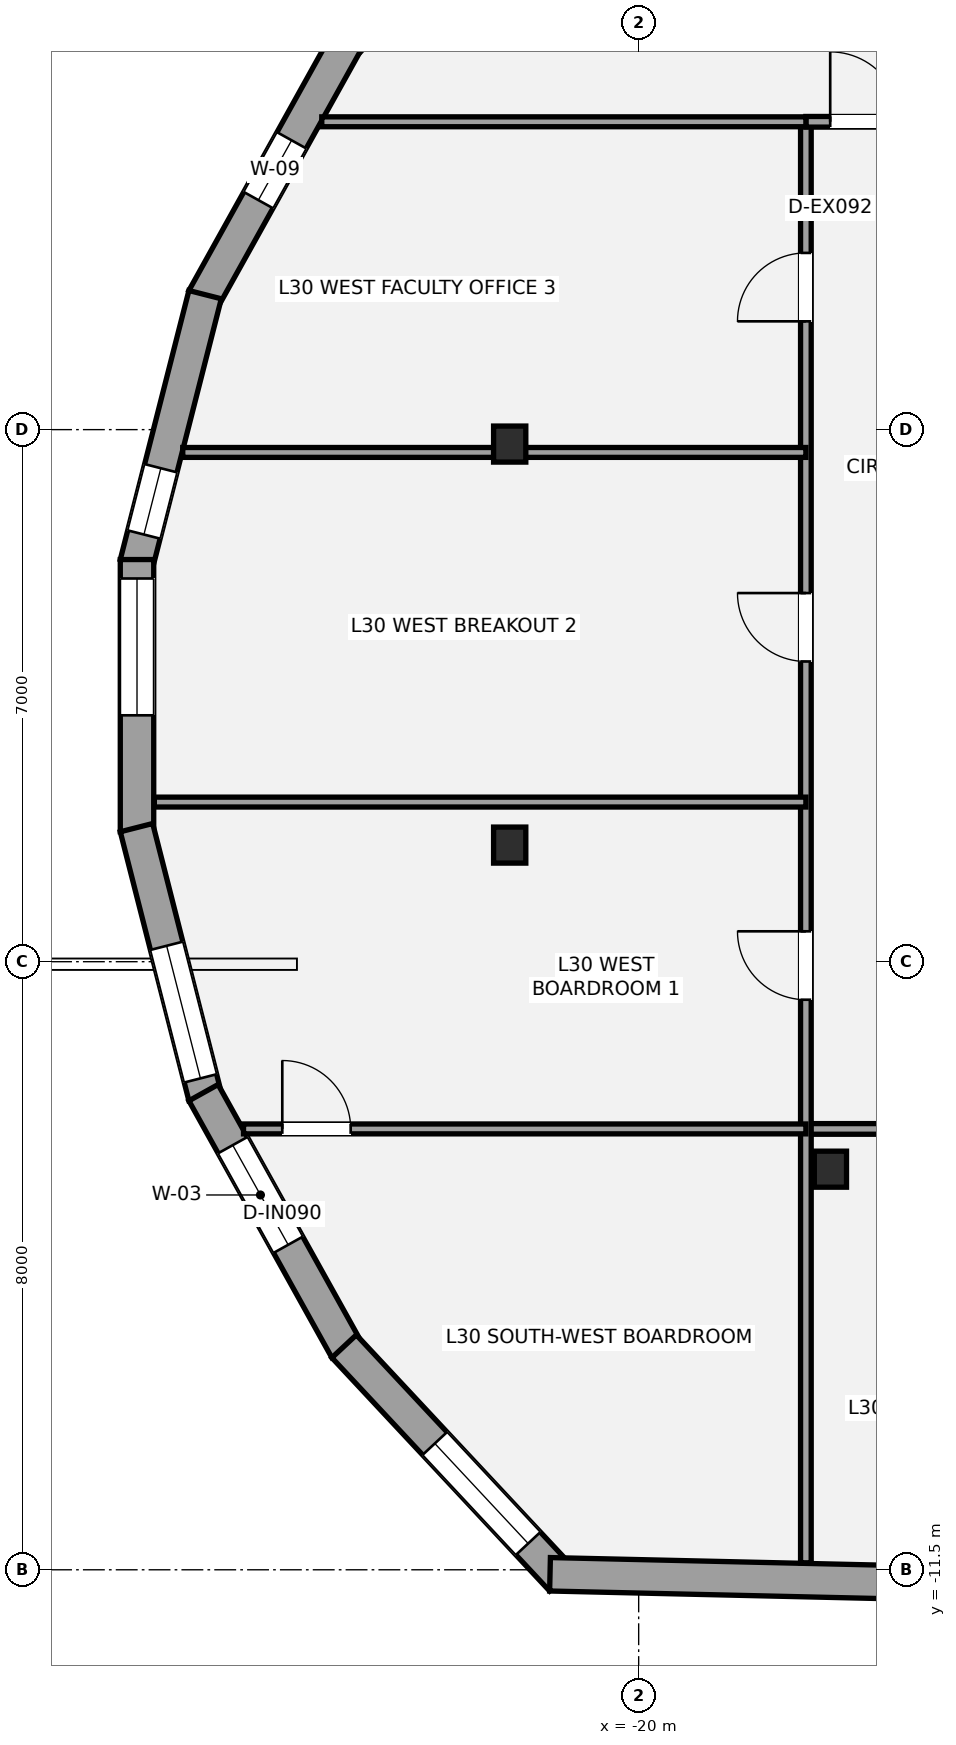
"""IFC4 building model, lengths in metres.
Left out: names, types, materials, properties, quantities, classifications, styles, units other than length and angle.
Written with IfcOpenShell. Run it as: python <this file> out.ifc"""

import sys

from ifc_helpers import new_model, si_unit, direction, frame, frame_2d, origin, origin_2d, place, context, subcontext, project, spatial, rectangle, i_section, extrude, element, fill, save


model = new_model("IFC4")
c1 = context("Model", 3, precision=1e-05, world=origin(), true_north=direction((0.0, 1.0)))
c2 = subcontext(c1, "Body", "Model", "MODEL_VIEW")
j1 = project(units=[si_unit("LENGTHUNIT", "METRE"), si_unit("PLANEANGLEUNIT", "RADIAN")], contexts=[c1])
p1 = place(None, origin())
s1 = spatial("IfcSite", under=j1, at=p1, CompositionType="ELEMENT")
p2 = place(p1, origin())
s2 = spatial("IfcBuilding", under=s1, at=p2, CompositionType="ELEMENT")
p3 = place(p2, frame((0.0, 0.0, 114.1)))
s3 = spatial("IfcBuildingStorey", under=s2, at=p3, CompositionType="ELEMENT", Elevation=114.1)
for number, where, z_axis, x_axis in (
    (1, (-21.697, 3.31, 0.0), (0.0, 0.0, 1.0), (1.0, 0.0, 0.0)),
    (2, (-21.697, -1.966, 0.0), (0.0, 0.0, 1.0), (1.0, 0.0, 0.0)),
    (3, (-17.477, -6.229, 0.0), (0.0, 0.0, 1.0), (1.0, 0.0, 0.0)),
):
    element("IfcColumn", number, at=place(p3, frame(where, z_axis=z_axis, x_axis=x_axis)), inside=s3, PredefinedType="COLUMN", context=c2, shape_type="SweptSolid", body=[
        extrude(i_section(OverallWidth=0.424, OverallDepth=0.474, WebThickness=0.048, FlangeThickness=0.077, at=origin_2d()), origin(), (0.0, 0.0, 1.0), 3.5),
    ])
p4 = place(p3, frame((-23.875, 8.56, 0.0), z_axis=(0.0, 0.0, 1.0), x_axis=(0.682353469166, 0.73102239577, 0.0)))
e4 = element("IfcWall", 4, at=p4, inside=s3, PredefinedType="STANDARD", context=c2, shape_type="SweptSolid", body=[
    extrude(rectangle(XDim=4.199, YDim=0.44, at=frame_2d((2.099, 0.0))), origin(), (0.0, 0.0, 1.0), 2.528),
])
p5 = place(p4, frame((0.7, 0.0, 0.65)))
e5 = element("IfcOpeningElement", 5, at=p5, cuts=e4, PredefinedType="OPENING", context=c2, shape_type="SweptSolid", body=[
    extrude(rectangle(XDim=1.8, YDim=1.7, at=frame_2d((0.9, 0.85))), frame((0.0, 0.23, 0.0), z_axis=(0.0, -1.0, 0.0), x_axis=(1.0, 0.0, 0.0)), (0.0, 0.0, 1.0), 0.46),
])
p6 = place(p3, frame((-25.725, 5.223, 0.0), z_axis=(0.0, 0.0, 1.0), x_axis=(0.486285838125, 0.873799796086, 0.0)))
e6 = element("IfcWall", 6, at=p6, inside=s3, PredefinedType="STANDARD", context=c2, shape_type="SweptSolid", body=[
    extrude(rectangle(XDim=3.868, YDim=0.44, at=frame_2d((1.934, 0.0))), origin(), (0.0, 0.0, 1.0), 2.528),
])
p7 = place(p6, frame((1.484, 0.0, 0.58)))
e7 = element("IfcOpeningElement", 7, at=p7, cuts=e6, PredefinedType="OPENING", context=c2, shape_type="SweptSolid", body=[
    extrude(rectangle(XDim=0.9, YDim=1.35, at=frame_2d((0.45, 0.675))), frame((0.0, 0.23, 0.0), z_axis=(0.0, -1.0, 0.0), x_axis=(1.0, 0.0, 0.0)), (0.0, 0.0, 1.0), 0.46),
])
p8 = place(p3, frame((-26.607, 1.736, 0.0), z_axis=(0.0, 0.0, 1.0), x_axis=(0.247172296022, 0.968971545547, 0.0)))
e8 = element("IfcWall", 8, at=p8, inside=s3, PredefinedType="STANDARD", context=c2, shape_type="SweptSolid", body=[
    extrude(rectangle(XDim=3.653, YDim=0.44, at=frame_2d((1.826, 0.0))), origin(), (0.0, 0.0, 1.0), 2.528),
])
p9 = place(p8, frame((0.396, 0.0, 0.58)))
e9 = element("IfcOpeningElement", 9, at=p9, cuts=e8, PredefinedType="OPENING", context=c2, shape_type="SweptSolid", body=[
    extrude(rectangle(XDim=0.9, YDim=1.35, at=frame_2d((0.45, 0.675))), frame((0.0, 0.23, 0.0), z_axis=(0.0, -1.0, 0.0), x_axis=(1.0, 0.0, 0.0)), (0.0, 0.0, 1.0), 0.46),
])
p10 = place(p3, frame((-26.6, -1.791, 0.0), z_axis=(0.0, 0.0, 1.0), x_axis=(0.0, 1.0, 0.0)))
e10 = element("IfcWall", 10, at=p10, inside=s3, PredefinedType="STANDARD", context=c2, shape_type="SweptSolid", body=[
    extrude(rectangle(XDim=3.582, YDim=0.44, at=frame_2d((1.791, 0.0))), origin(), (0.0, 0.0, 1.0), 2.528),
])
p11 = place(p10, frame((1.532, 0.0, 0.65)))
e11 = element("IfcOpeningElement", 11, at=p11, cuts=e10, PredefinedType="OPENING", context=c2, shape_type="SweptSolid", body=[
    extrude(rectangle(XDim=1.8, YDim=1.7, at=frame_2d((0.9, 0.85))), frame((0.0, 0.23, 0.0), z_axis=(0.0, -1.0, 0.0), x_axis=(1.0, 0.0, 0.0)), (0.0, 0.0, 1.0), 0.46),
])
p12 = place(p3, frame((-25.704, -5.276, 0.0), z_axis=(0.0, 0.0, 1.0), x_axis=(-0.247172296022, 0.968971545547, 0.0)))
e12 = element("IfcWall", 12, at=p12, inside=s3, PredefinedType="STANDARD", context=c2, shape_type="SweptSolid", body=[
    extrude(rectangle(XDim=3.653, YDim=0.44, at=frame_2d((1.826, 0.0))), origin(), (0.0, 0.0, 1.0), 2.528),
])
p13 = place(p12, frame((0.248, 0.0, 0.65)))
e13 = element("IfcOpeningElement", 13, at=p13, cuts=e12, PredefinedType="OPENING", context=c2, shape_type="SweptSolid", body=[
    extrude(rectangle(XDim=1.8, YDim=1.7, at=frame_2d((0.9, 0.85))), frame((0.0, 0.23, 0.0), z_axis=(0.0, -1.0, 0.0), x_axis=(1.0, 0.0, 0.0)), (0.0, 0.0, 1.0), 0.46),
])
p14 = place(p3, frame((-23.844, -8.603, 0.0), z_axis=(0.0, 0.0, 1.0), x_axis=(-0.486285838125, 0.873799796086, 0.0)))
e14 = element("IfcWall", 14, at=p14, inside=s3, PredefinedType="STANDARD", context=c2, shape_type="SweptSolid", body=[
    extrude(rectangle(XDim=3.868, YDim=0.44, at=frame_2d((1.934, 0.0))), origin(), (0.0, 0.0, 1.0), 2.528),
])
p15 = place(p14, frame((1.578, 0.0, 0.65)))
e15 = element("IfcOpeningElement", 15, at=p15, cuts=e14, PredefinedType="OPENING", context=c2, shape_type="SweptSolid", body=[
    extrude(rectangle(XDim=1.5, YDim=1.7, at=frame_2d((0.75, 0.85))), frame((0.0, 0.23, 0.0), z_axis=(0.0, -1.0, 0.0), x_axis=(1.0, 0.0, 0.0)), (0.0, 0.0, 1.0), 0.46),
])
p16 = place(p3, frame((-21.01, -11.629, 0.0), z_axis=(0.0, 0.0, 1.0), x_axis=(-0.682353469166, 0.73102239577, 0.0)))
e16 = element("IfcWall", 16, at=p16, inside=s3, PredefinedType="STANDARD", context=c2, shape_type="SweptSolid", body=[
    extrude(rectangle(XDim=4.199, YDim=0.44, at=frame_2d((2.099, 0.0))), origin(), (0.0, 0.0, 1.0), 2.528),
])
p17 = place(p16, frame((0.65, 0.0, 0.65)))
e17 = element("IfcOpeningElement", 17, at=p17, cuts=e16, PredefinedType="OPENING", context=c2, shape_type="SweptSolid", body=[
    extrude(rectangle(XDim=1.8, YDim=1.7, at=frame_2d((0.9, 0.85))), frame((0.0, 0.23, 0.0), z_axis=(0.0, -1.0, 0.0), x_axis=(1.0, 0.0, 0.0)), (0.0, 0.0, 1.0), 0.46),
])
p18 = place(p3, frame((-14.44, -11.713, 0.0), z_axis=(0.0, 0.0, 1.0), x_axis=(-0.999739488543, 0.022824439704, 0.0)))
e18 = element("IfcWall", 18, at=p18, inside=s3, PredefinedType="STANDARD", context=c2, shape_type="SweptSolid", body=[
    extrude(rectangle(XDim=6.728, YDim=0.44, at=frame_2d((3.364, 0.0))), origin(), (0.0, 0.0, 1.0), 2.532),
])
p19 = place(p3, frame((-17.8, -5.7, 0.0), z_axis=(0.0, 0.0, 1.0), x_axis=(1.0, 0.0, 0.0)))
e19 = element("IfcWall", 19, at=p19, inside=s3, PredefinedType="PARTITIONING", context=c2, shape_type="SweptSolid", body=[
    extrude(rectangle(XDim=34.2, YDim=0.14, at=frame_2d((17.1, 0.0))), origin(), (0.0, 0.0, 1.0), 2.688),
])
p20 = place(p19, frame((3.4, 0.0, 0.0)))
e20 = element("IfcOpeningElement", 20, at=p20, cuts=e19, PredefinedType="OPENING", context=c2, shape_type="SweptSolid", body=[
    extrude(rectangle(XDim=1.5, YDim=2.15, at=frame_2d((0.75, 1.075))), frame((0.0, 0.08, 0.0), z_axis=(0.0, -1.0, 0.0), x_axis=(1.0, 0.0, 0.0)), (0.0, 0.0, 1.0), 0.16),
])
p21 = place(p19, frame((9.874, 0.0, 0.0)))
e21 = element("IfcOpeningElement", 21, at=p21, cuts=e19, PredefinedType="OPENING", context=c2, shape_type="SweptSolid", body=[
    extrude(rectangle(XDim=0.9, YDim=2.1, at=frame_2d((0.45, 1.05))), frame((0.0, 0.08, 0.0), z_axis=(0.0, -1.0, 0.0), x_axis=(1.0, 0.0, 0.0)), (0.0, 0.0, 1.0), 0.16),
])
p22 = place(p19, frame((13.147, 0.0, 0.0)))
e22 = element("IfcOpeningElement", 22, at=p22, cuts=e19, PredefinedType="OPENING", context=c2, shape_type="SweptSolid", body=[
    extrude(rectangle(XDim=0.9, YDim=2.1, at=frame_2d((0.45, 1.05))), frame((0.0, 0.08, 0.0), z_axis=(0.0, -1.0, 0.0), x_axis=(1.0, 0.0, 0.0)), (0.0, 0.0, 1.0), 0.16),
])
p23 = place(p19, frame((18.823, 0.0, 0.0)))
e23 = element("IfcOpeningElement", 23, at=p23, cuts=e19, PredefinedType="OPENING", context=c2, shape_type="SweptSolid", body=[
    extrude(rectangle(XDim=1.5, YDim=2.15, at=frame_2d((0.75, 1.075))), frame((0.0, 0.08, 0.0), z_axis=(0.0, -1.0, 0.0), x_axis=(1.0, 0.0, 0.0)), (0.0, 0.0, 1.0), 0.16),
])
p24 = place(p19, frame((28.5, 0.0, 0.0)))
e24 = element("IfcOpeningElement", 24, at=p24, cuts=e19, PredefinedType="OPENING", context=c2, shape_type="SweptSolid", body=[
    extrude(rectangle(XDim=1.5, YDim=2.15, at=frame_2d((0.75, 1.075))), frame((0.0, 0.08, 0.0), z_axis=(0.0, -1.0, 0.0), x_axis=(1.0, 0.0, 0.0)), (0.0, 0.0, 1.0), 0.16),
])
p25 = place(p3, frame((-17.8, -11.408, 0.0), z_axis=(0.0, 0.0, 1.0), x_axis=(0.0, 1.0, 0.0)))
e25 = element("IfcWall", 25, at=p25, inside=s3, PredefinedType="PARTITIONING", context=c2, shape_type="SweptSolid", body=[
    extrude(rectangle(XDim=18.958, YDim=0.14, at=frame_2d((9.479, 0.0))), origin(), (0.0, 0.0, 1.0), 2.688),
])
p26 = place(p25, frame((7.408, 0.0, 0.0)))
e26 = element("IfcOpeningElement", 26, at=p26, cuts=e25, PredefinedType="OPENING", context=c2, shape_type="SweptSolid", body=[
    extrude(rectangle(XDim=0.9, YDim=2.1, at=frame_2d((0.45, 1.05))), frame((0.0, 0.08, 0.0), z_axis=(0.0, -1.0, 0.0), x_axis=(1.0, 0.0, 0.0)), (0.0, 0.0, 1.0), 0.16),
])
p27 = place(p25, frame((11.858, 0.0, 0.0)))
e27 = element("IfcOpeningElement", 27, at=p27, cuts=e25, PredefinedType="OPENING", context=c2, shape_type="SweptSolid", body=[
    extrude(rectangle(XDim=0.9, YDim=2.1, at=frame_2d((0.45, 1.05))), frame((0.0, 0.08, 0.0), z_axis=(0.0, -1.0, 0.0), x_axis=(1.0, 0.0, 0.0)), (0.0, 0.0, 1.0), 0.16),
])
p28 = place(p25, frame((16.333, 0.0, 0.0)))
e28 = element("IfcOpeningElement", 28, at=p28, cuts=e25, PredefinedType="OPENING", context=c2, shape_type="SweptSolid", body=[
    extrude(rectangle(XDim=0.9, YDim=2.1, at=frame_2d((0.45, 1.05))), frame((0.0, 0.08, 0.0), z_axis=(0.0, -1.0, 0.0), x_axis=(1.0, 0.0, 0.0)), (0.0, 0.0, 1.0), 0.16),
])
p29 = place(p3, frame((-17.8, 7.55, 0.0), z_axis=(0.0, 0.0, 1.0), x_axis=(1.0, 0.0, 0.0)))
e29 = element("IfcWall", 29, at=p29, inside=s3, PredefinedType="PARTITIONING", context=c2, shape_type="SweptSolid", body=[
    extrude(rectangle(XDim=3.9, YDim=0.14, at=frame_2d((1.95, 0.0))), origin(), (0.0, 0.0, 1.0), 2.763),
])
p30 = place(p29, frame((0.32, 0.0, 0.0)))
e30 = element("IfcOpeningElement", 30, at=p30, cuts=e29, PredefinedType="OPENING", context=c2, shape_type="SweptSolid", body=[
    extrude(rectangle(XDim=0.92, YDim=2.15, at=frame_2d((0.46, 1.075))), frame((0.0, 0.08, 0.0), z_axis=(0.0, -1.0, 0.0), x_axis=(1.0, 0.0, 0.0)), (0.0, 0.0, 1.0), 0.16),
])
p31 = place(p3, frame((-24.169, 7.55, 0.0), z_axis=(0.0, 0.0, 1.0), x_axis=(1.0, 0.0, 0.0)))
e31 = element("IfcWall", 31, at=p31, inside=s3, PredefinedType="PARTITIONING", context=c2, shape_type="SweptSolid", body=[
    extrude(rectangle(XDim=6.369, YDim=0.13, at=frame_2d((3.185, 0.0))), origin(), (0.0, 0.0, 1.0), 3.31),
])
p32 = place(p3, frame((-25.199, -5.7, 0.0), z_axis=(0.0, 0.0, 1.0), x_axis=(1.0, 0.0, 0.0)))
e32 = element("IfcWall", 32, at=p32, inside=s3, PredefinedType="PARTITIONING", context=c2, shape_type="SweptSolid", body=[
    extrude(rectangle(XDim=7.399, YDim=0.13, at=frame_2d((3.699, 0.0))), origin(), (0.0, 0.0, 1.0), 2.688),
])
p33 = place(p32, frame((0.51, 0.0, 0.0)))
e33 = element("IfcOpeningElement", 33, at=p33, cuts=e32, PredefinedType="OPENING", context=c2, shape_type="SweptSolid", body=[
    extrude(rectangle(XDim=0.9, YDim=2.1, at=frame_2d((0.45, 1.05))), frame((0.0, 0.075, 0.0), z_axis=(0.0, -1.0, 0.0), x_axis=(1.0, 0.0, 0.0)), (0.0, 0.0, 1.0), 0.15),
])
p34 = place(p3, frame((-26.372, -1.4, 0.0), z_axis=(0.0, 0.0, 1.0), x_axis=(1.0, 0.0, 0.0)))
e34 = element("IfcWall", 34, at=p34, inside=s3, PredefinedType="PARTITIONING", context=c2, shape_type="SweptSolid", body=[
    extrude(rectangle(XDim=8.572, YDim=0.13, at=frame_2d((4.286, 0.0))), origin(), (0.0, 0.0, 1.0), 2.763),
])
p35 = place(p3, frame((-25.999, 3.2, 0.0), z_axis=(0.0, 0.0, 1.0), x_axis=(1.0, 0.0, 0.0)))
e35 = element("IfcWall", 35, at=p35, inside=s3, PredefinedType="PARTITIONING", context=c2, shape_type="SweptSolid", body=[
    extrude(rectangle(XDim=8.198, YDim=0.13, at=frame_2d((4.099, 0.0))), origin(), (0.0, 0.0, 1.0), 2.763),
])
p36 = place(p7, origin())
e36 = element("IfcWindow", 36, at=p36, inside=s3, PartitioningType="SINGLE_PANEL", PredefinedType="WINDOW", context=c2, shape_type="SweptSolid", body=[
    extrude(rectangle(XDim=0.9, YDim=1.35, at=frame_2d((0.45, 0.675))), frame((0.0, -0.01, 0.0), z_axis=(0.0, -1.0, 0.0), x_axis=(1.0, 0.0, 0.0)), (0.0, 0.0, 1.0), 0.06),
])
fill(e7, e36)
p37 = place(p9, origin())
e37 = element("IfcWindow", 37, at=p37, inside=s3, PartitioningType="SINGLE_PANEL", PredefinedType="WINDOW", context=c2, shape_type="SweptSolid", body=[
    extrude(rectangle(XDim=0.9, YDim=1.35, at=frame_2d((0.45, 0.675))), frame((0.0, -0.01, 0.0), z_axis=(0.0, -1.0, 0.0), x_axis=(1.0, 0.0, 0.0)), (0.0, 0.0, 1.0), 0.06),
])
fill(e9, e37)
p38 = place(p11, origin())
e38 = element("IfcWindow", 38, at=p38, inside=s3, PartitioningType="SINGLE_PANEL", PredefinedType="WINDOW", context=c2, shape_type="SweptSolid", body=[
    extrude(rectangle(XDim=1.8, YDim=1.7, at=frame_2d((0.9, 0.85))), frame((0.0, -0.01, 0.0), z_axis=(0.0, -1.0, 0.0), x_axis=(1.0, 0.0, 0.0)), (0.0, 0.0, 1.0), 0.06),
])
fill(e11, e38)
p39 = place(p13, origin())
e39 = element("IfcWindow", 39, at=p39, inside=s3, PartitioningType="SINGLE_PANEL", PredefinedType="WINDOW", context=c2, shape_type="SweptSolid", body=[
    extrude(rectangle(XDim=1.8, YDim=1.7, at=frame_2d((0.9, 0.85))), frame((0.0, -0.01, 0.0), z_axis=(0.0, -1.0, 0.0), x_axis=(1.0, 0.0, 0.0)), (0.0, 0.0, 1.0), 0.06),
])
fill(e13, e39)
p40 = place(p15, origin())
e40 = element("IfcWindow", 40, at=p40, inside=s3, PartitioningType="SINGLE_PANEL", PredefinedType="WINDOW", context=c2, shape_type="SweptSolid", body=[
    extrude(rectangle(XDim=1.5, YDim=1.7, at=frame_2d((0.75, 0.85))), frame((0.0, -0.01, 0.0), z_axis=(0.0, -1.0, 0.0), x_axis=(1.0, 0.0, 0.0)), (0.0, 0.0, 1.0), 0.06),
])
fill(e15, e40)
p41 = place(p17, origin())
e41 = element("IfcWindow", 41, at=p41, inside=s3, PartitioningType="SINGLE_PANEL", PredefinedType="WINDOW", context=c2, shape_type="SweptSolid", body=[
    extrude(rectangle(XDim=1.8, YDim=1.7, at=frame_2d((0.9, 0.85))), frame((0.0, -0.01, 0.0), z_axis=(0.0, -1.0, 0.0), x_axis=(1.0, 0.0, 0.0)), (0.0, 0.0, 1.0), 0.06),
])
fill(e17, e41)
p42 = place(p30, origin())
e42 = element("IfcDoor", 42, at=p42, inside=s3, OperationType="SINGLE_SWING_LEFT", PredefinedType="DOOR", context=c2, shape_type="SweptSolid", body=[
    extrude(rectangle(XDim=0.92, YDim=2.15, at=frame_2d((0.46, 1.075))), frame((0.0, 0.025, 0.0), z_axis=(0.0, -1.0, 0.0), x_axis=(1.0, 0.0, 0.0)), (0.0, 0.0, 1.0), 0.05),
])
fill(e30, e42)
p43 = place(p33, origin())
e43 = element("IfcDoor", 43, at=p43, inside=s3, OperationType="SINGLE_SWING_LEFT", PredefinedType="DOOR", context=c2, shape_type="SweptSolid", body=[
    extrude(rectangle(XDim=0.9, YDim=2.1, at=frame_2d((0.45, 1.05))), frame((0.0, 0.025, 0.0), z_axis=(0.0, -1.0, 0.0), x_axis=(1.0, 0.0, 0.0)), (0.0, 0.0, 1.0), 0.05),
])
fill(e33, e43)
p44 = place(p26, origin())
e44 = element("IfcDoor", 44, at=p44, inside=s3, OperationType="SINGLE_SWING_RIGHT", PredefinedType="DOOR", context=c2, shape_type="SweptSolid", body=[
    extrude(rectangle(XDim=0.9, YDim=2.1, at=frame_2d((0.45, 1.05))), frame((0.0, 0.025, 0.0), z_axis=(0.0, -1.0, 0.0), x_axis=(1.0, 0.0, 0.0)), (0.0, 0.0, 1.0), 0.05),
])
fill(e26, e44)
p45 = place(p27, origin())
e45 = element("IfcDoor", 45, at=p45, inside=s3, OperationType="SINGLE_SWING_RIGHT", PredefinedType="DOOR", context=c2, shape_type="SweptSolid", body=[
    extrude(rectangle(XDim=0.9, YDim=2.1, at=frame_2d((0.45, 1.05))), frame((0.0, 0.025, 0.0), z_axis=(0.0, -1.0, 0.0), x_axis=(1.0, 0.0, 0.0)), (0.0, 0.0, 1.0), 0.05),
])
fill(e27, e45)
p46 = place(p28, origin())
e46 = element("IfcDoor", 46, at=p46, inside=s3, OperationType="SINGLE_SWING_LEFT", PredefinedType="DOOR", context=c2, shape_type="SweptSolid", body=[
    extrude(rectangle(XDim=0.9, YDim=2.1, at=frame_2d((0.45, 1.05))), frame((0.0, 0.025, 0.0), z_axis=(0.0, -1.0, 0.0), x_axis=(1.0, 0.0, 0.0)), (0.0, 0.0, 1.0), 0.05),
])
fill(e28, e46)
save(model, sys.argv[1])
